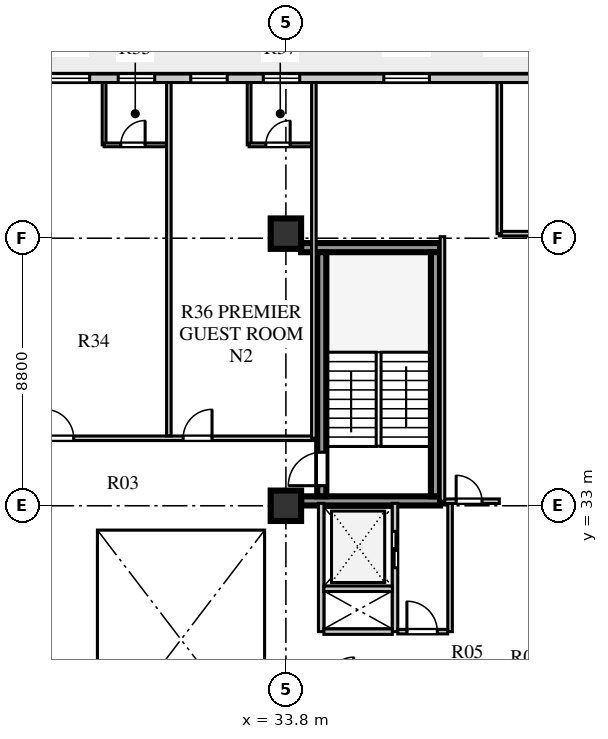
"""IFC4 building model, lengths in metres.
Left out: names, types, materials, properties, quantities, classifications, styles, units other than length and angle.
Written with IfcOpenShell. Run it as: python <this file> out.ifc"""

import sys

from ifc_helpers import new_model, si_unit, direction, frame, frame_2d, origin, origin_2d, place, context, subcontext, project, spatial, rectangle, extrude, element, fill, save


model = new_model("IFC4")
c1 = context("Model", 3, precision=1e-05, world=origin(), true_north=direction((0.0, 1.0)))
c2 = subcontext(c1, "Body", "Model", "MODEL_VIEW")
j1 = project(units=[si_unit("LENGTHUNIT", "METRE"), si_unit("PLANEANGLEUNIT", "RADIAN")], contexts=[c1])
p1 = place(None, origin())
s1 = spatial("IfcSite", under=j1, at=p1, CompositionType="ELEMENT")
p2 = place(p1, origin())
s2 = spatial("IfcBuilding", under=s1, at=p2, CompositionType="ELEMENT")
p3 = place(p2, frame((0.0, 0.0, 134.8)))
s3 = spatial("IfcBuildingStorey", under=s2, at=p3, CompositionType="ELEMENT", Elevation=134.8)
for number, where, z_axis, x_axis in (
    (1, (34.3, 33.16, 0.0), (0.0, 0.0, 1.0), (1.0, 0.0, 0.0)),
    (2, (34.3, 41.49, 0.0), (0.0, 0.0, 1.0), (1.0, 0.0, 0.0)),
):
    element("IfcWall", number, at=place(p3, frame(where, z_axis=z_axis, x_axis=x_axis)), inside=s3, PredefinedType="SHEAR", context=c2, shape_type="SweptSolid", body=[
        extrude(rectangle(XDim=4.57, YDim=0.3, at=frame_2d((2.285, 0.0))), origin(), (0.0, 0.0, 1.0), 3.6),
    ])
p4 = place(p3, frame((34.98, 33.31, 0.0), z_axis=(0.0, 0.0, 1.0), x_axis=(0.0, 1.0, 0.0)))
e3 = element("IfcWall", 3, at=p4, inside=s3, PredefinedType="SHEAR", context=c2, shape_type="SweptSolid", body=[
    extrude(rectangle(XDim=8.03, YDim=0.3, at=frame_2d((4.015, 0.0))), origin(), (0.0, 0.0, 1.0), 3.6),
])
p5 = place(p4, frame((0.35, 0.0, 0.0)))
e4 = element("IfcOpeningElement", 4, at=p5, cuts=e3, PredefinedType="OPENING", context=c2, shape_type="SweptSolid", body=[
    extrude(rectangle(XDim=1.1, YDim=2.1, at=frame_2d((0.55, 1.05))), frame((0.0, 0.16, 0.0), z_axis=(0.0, -1.0, 0.0), x_axis=(1.0, 0.0, 0.0)), (0.0, 0.0, 1.0), 0.32),
])
p6 = place(p3, frame((38.72, 33.31, 0.0), z_axis=(0.0, 0.0, 1.0), x_axis=(0.0, 1.0, 0.0)))
e5 = element("IfcWall", 5, at=p6, inside=s3, PredefinedType="SHEAR", context=c2, shape_type="SweptSolid", body=[
    extrude(rectangle(XDim=8.03, YDim=0.3, at=frame_2d((4.015, 0.0))), origin(), (0.0, 0.0, 1.0), 3.6),
])
for number, where, z_axis, x_axis in (
    (6, (33.8, 33.0, 0.0), (0.0, 0.0, 1.0), (1.0, 0.0, 0.0)),
    (7, (33.8, 41.95, 0.0), (0.0, 0.0, 1.0), (1.0, 0.0, 0.0)),
):
    element("IfcColumn", number, at=place(p3, frame(where, z_axis=z_axis, x_axis=x_axis)), inside=s3, PredefinedType="COLUMN", context=c2, shape_type="SweptSolid", body=[
        extrude(rectangle(XDim=1.0, YDim=1.0, at=origin_2d()), origin(), (0.0, 0.0, 1.0), 3.6),
    ])
p7 = place(p3, frame((45.35, 47.06, 0.0), z_axis=(0.0, 0.0, 1.0), x_axis=(-1.0, 0.0, 0.0)))
e8 = element("IfcWall", 8, at=p7, inside=s3, PredefinedType="STANDARD", context=c2, shape_type="SweptSolid", body=[
    extrude(rectangle(XDim=32.1, YDim=0.28, at=frame_2d((16.05, 0.0))), origin(), (0.0, 0.0, 1.0), 3.6),
])
p8 = place(p7, frame((30.15, 0.0, 0.0)))
e9 = element("IfcOpeningElement", 9, at=p8, cuts=e8, PredefinedType="OPENING", context=c2, shape_type="SweptSolid", body=[
    extrude(rectangle(XDim=1.0, YDim=2.05, at=frame_2d((0.5, 1.025))), frame((0.0, 0.15, 0.0), z_axis=(0.0, -1.0, 0.0), x_axis=(1.0, 0.0, 0.0)), (0.0, 0.0, 1.0), 0.3),
])
p9 = place(p7, frame((24.495, 0.0, 0.8)))
e10 = element("IfcOpeningElement", 10, at=p9, cuts=e8, PredefinedType="OPENING", context=c2, shape_type="SweptSolid", body=[
    extrude(rectangle(XDim=1.35, YDim=1.9, at=frame_2d((0.675, 0.95))), frame((0.0, 0.15, 0.0), z_axis=(0.0, -1.0, 0.0), x_axis=(1.0, 0.0, 0.0)), (0.0, 0.0, 1.0), 0.3),
])
p10 = place(p7, frame((18.005, 0.0, 0.8)))
e11 = element("IfcOpeningElement", 11, at=p10, cuts=e8, PredefinedType="OPENING", context=c2, shape_type="SweptSolid", body=[
    extrude(rectangle(XDim=1.65, YDim=1.95, at=frame_2d((0.825, 0.975))), frame((0.0, 0.15, 0.0), z_axis=(0.0, -1.0, 0.0), x_axis=(1.0, 0.0, 0.0)), (0.0, 0.0, 1.0), 0.3),
])
p11 = place(p7, frame((15.865, 0.0, 0.8)))
e12 = element("IfcOpeningElement", 12, at=p11, cuts=e8, PredefinedType="OPENING", context=c2, shape_type="SweptSolid", body=[
    extrude(rectangle(XDim=1.2, YDim=1.75, at=frame_2d((0.6, 0.875))), frame((0.0, 0.15, 0.0), z_axis=(0.0, -1.0, 0.0), x_axis=(1.0, 0.0, 0.0)), (0.0, 0.0, 1.0), 0.3),
])
p12 = place(p7, frame((13.48, 0.0, 0.8)))
e13 = element("IfcOpeningElement", 13, at=p12, cuts=e8, PredefinedType="OPENING", context=c2, shape_type="SweptSolid", body=[
    extrude(rectangle(XDim=1.2, YDim=1.75, at=frame_2d((0.6, 0.875))), frame((0.0, 0.15, 0.0), z_axis=(0.0, -1.0, 0.0), x_axis=(1.0, 0.0, 0.0)), (0.0, 0.0, 1.0), 0.3),
])
p13 = place(p7, frame((11.095, 0.0, 0.8)))
e14 = element("IfcOpeningElement", 14, at=p13, cuts=e8, PredefinedType="OPENING", context=c2, shape_type="SweptSolid", body=[
    extrude(rectangle(XDim=1.2, YDim=1.75, at=frame_2d((0.6, 0.875))), frame((0.0, 0.15, 0.0), z_axis=(0.0, -1.0, 0.0), x_axis=(1.0, 0.0, 0.0)), (0.0, 0.0, 1.0), 0.3),
])
p14 = place(p7, frame((6.83, 0.0, 0.8)))
e15 = element("IfcOpeningElement", 15, at=p14, cuts=e8, PredefinedType="OPENING", context=c2, shape_type="SweptSolid", body=[
    extrude(rectangle(XDim=1.5, YDim=2.0, at=frame_2d((0.75, 1.0))), frame((0.0, 0.15, 0.0), z_axis=(0.0, -1.0, 0.0), x_axis=(1.0, 0.0, 0.0)), (0.0, 0.0, 1.0), 0.3),
])
p15 = place(p7, frame((1.72, 0.0, 0.8)))
e16 = element("IfcOpeningElement", 16, at=p15, cuts=e8, PredefinedType="OPENING", context=c2, shape_type="SweptSolid", body=[
    extrude(rectangle(XDim=1.2, YDim=1.75, at=frame_2d((0.6, 0.875))), frame((0.0, 0.15, 0.0), z_axis=(0.0, -1.0, 0.0), x_axis=(1.0, 0.0, 0.0)), (0.0, 0.0, 1.0), 0.3),
])
p16 = place(p3, frame((34.96, 28.86, 0.0), z_axis=(0.0, 0.0, 1.0), x_axis=(0.0, 1.0, 0.0)))
e17 = element("IfcWall", 17, at=p16, inside=s3, PredefinedType="SOLIDWALL", context=c2, shape_type="SweptSolid", body=[
    extrude(rectangle(XDim=4.22, YDim=0.18, at=frame_2d((2.11, 0.0))), origin(), (0.0, 0.0, 1.0), 3.6),
])
p17 = place(p3, frame((37.39, 28.86, 0.0), z_axis=(0.0, 0.0, 1.0), x_axis=(0.0, 1.0, 0.0)))
e18 = element("IfcWall", 18, at=p17, inside=s3, PredefinedType="SOLIDWALL", context=c2, shape_type="SweptSolid", body=[
    extrude(rectangle(XDim=4.22, YDim=0.18, at=frame_2d((2.11, 0.0))), origin(), (0.0, 0.0, 1.0), 3.6),
])
p18 = place(p17, frame((2.1, 0.0, 0.0)))
e19 = element("IfcOpeningElement", 19, at=p18, cuts=e18, PredefinedType="OPENING", context=c2, shape_type="SweptSolid", body=[
    extrude(rectangle(XDim=1.2, YDim=2.12, at=frame_2d((0.6, 1.06))), frame((0.0, 0.1, 0.0), z_axis=(0.0, -1.0, 0.0), x_axis=(1.0, 0.0, 0.0)), (0.0, 0.0, 1.0), 0.2),
])
for number, where, z_axis, x_axis in (
    (20, (35.05, 28.86, 0.0), (0.0, 0.0, 1.0), (1.0, 0.0, 0.0)),
    (21, (35.05, 30.27, 0.0), (0.0, 0.0, 1.0), (1.0, 0.0, 0.0)),
):
    element("IfcWall", number, at=place(p3, frame(where, z_axis=z_axis, x_axis=x_axis)), inside=s3, PredefinedType="SOLIDWALL", context=c2, shape_type="SweptSolid", body=[
        extrude(rectangle(XDim=2.25, YDim=0.18, at=frame_2d((1.125, 0.0))), origin(), (0.0, 0.0, 1.0), 3.6),
    ])
p19 = place(p3, frame((39.2, 28.86, 0.0), z_axis=(0.0, 0.0, 1.0), x_axis=(0.0, 1.0, 0.0)))
e22 = element("IfcWall", 22, at=p19, inside=s3, PredefinedType="PARTITIONING", context=c2, shape_type="SweptSolid", body=[
    extrude(rectangle(XDim=4.22, YDim=0.15, at=frame_2d((2.11, 0.0))), origin(), (0.0, 0.0, 1.0), 3.6),
])
p20 = place(p3, frame((37.48, 28.86, 0.0), z_axis=(0.0, 0.0, 1.0), x_axis=(1.0, 0.0, 0.0)))
e23 = element("IfcWall", 23, at=p20, inside=s3, PredefinedType="PARTITIONING", context=c2, shape_type="SweptSolid", body=[
    extrude(rectangle(XDim=1.64, YDim=0.15, at=frame_2d((0.82, 0.0))), origin(), (0.0, 0.0, 1.0), 3.6),
])
p21 = place(p20, frame((0.3, 0.0, 0.0)))
e24 = element("IfcOpeningElement", 24, at=p21, cuts=e23, PredefinedType="OPENING", context=c2, shape_type="SweptSolid", body=[
    extrude(rectangle(XDim=1.0, YDim=2.1, at=frame_2d((0.5, 1.05))), frame((0.0, 0.085, 0.0), z_axis=(0.0, -1.0, 0.0), x_axis=(1.0, 0.0, 0.0)), (0.0, 0.0, 1.0), 0.17),
])
p22 = place(p3, frame((25.22, 35.22, 0.0), z_axis=(0.0, 0.0, 1.0), x_axis=(1.0, 0.0, 0.0)))
e25 = element("IfcWall", 25, at=p22, inside=s3, PredefinedType="PARTITIONING", context=c2, shape_type="SweptSolid", body=[
    extrude(rectangle(XDim=9.5, YDim=0.15, at=frame_2d((4.75, 0.0))), origin(), (0.0, 0.0, 1.0), 3.6),
])
p23 = place(p22, frame((0.65, 0.0, 0.0)))
e26 = element("IfcOpeningElement", 26, at=p23, cuts=e25, PredefinedType="OPENING", context=c2, shape_type="SweptSolid", body=[
    extrude(rectangle(XDim=0.95, YDim=2.1, at=frame_2d((0.475, 1.05))), frame((0.0, 0.085, 0.0), z_axis=(0.0, -1.0, 0.0), x_axis=(1.0, 0.0, 0.0)), (0.0, 0.0, 1.0), 0.17),
])
p24 = place(p22, frame((5.2, 0.0, 0.0)))
e27 = element("IfcOpeningElement", 27, at=p24, cuts=e25, PredefinedType="OPENING", context=c2, shape_type="SweptSolid", body=[
    extrude(rectangle(XDim=0.95, YDim=2.1, at=frame_2d((0.475, 1.05))), frame((0.0, 0.085, 0.0), z_axis=(0.0, -1.0, 0.0), x_axis=(1.0, 0.0, 0.0)), (0.0, 0.0, 1.0), 0.17),
])
p25 = place(p3, frame((40.82, 41.95, 0.0), z_axis=(0.0, 0.0, 1.0), x_axis=(1.0, 0.0, 0.0)))
e28 = element("IfcWall", 28, at=p25, inside=s3, PredefinedType="PARTITIONING", context=c2, shape_type="SweptSolid", body=[
    extrude(rectangle(XDim=7.3, YDim=0.15, at=frame_2d((3.65, 0.0))), origin(), (0.0, 0.0, 1.0), 2.95),
])
p26 = place(p3, frame((34.72, 35.22, 0.0), z_axis=(0.0, 0.0, 1.0), x_axis=(0.0, 1.0, 0.0)))
e29 = element("IfcWall", 29, at=p26, inside=s3, PredefinedType="PARTITIONING", context=c2, shape_type="SweptSolid", body=[
    extrude(rectangle(XDim=11.7, YDim=0.15, at=frame_2d((5.85, 0.0))), origin(), (0.0, 0.0, 1.0), 3.6),
])
p27 = place(p3, frame((29.95, 35.3, 0.0), z_axis=(0.0, 0.0, 1.0), x_axis=(0.0, 1.0, 0.0)))
e30 = element("IfcWall", 30, at=p27, inside=s3, PredefinedType="PARTITIONING", context=c2, shape_type="SweptSolid", body=[
    extrude(rectangle(XDim=11.62, YDim=0.15, at=frame_2d((5.81, 0.0))), origin(), (0.0, 0.0, 1.0), 3.6),
])
p28 = place(p3, frame((27.82, 44.87, 0.0), z_axis=(0.0, 0.0, 1.0), x_axis=(0.0, 1.0, 0.0)))
e31 = element("IfcWall", 31, at=p28, inside=s3, PredefinedType="PLUMBINGWALL", context=c2, shape_type="SweptSolid", body=[
    extrude(rectangle(XDim=2.05, YDim=0.125, at=frame_2d((1.025, 0.0))), origin(), (0.0, 0.0, 1.0), 3.6),
])
p29 = place(p3, frame((27.82, 44.87, 0.0), z_axis=(0.0, 0.0, 1.0), x_axis=(1.0, 0.0, 0.0)))
e32 = element("IfcWall", 32, at=p29, inside=s3, PredefinedType="PLUMBINGWALL", context=c2, shape_type="SweptSolid", body=[
    extrude(rectangle(XDim=2.05, YDim=0.125, at=frame_2d((1.025, 0.0))), origin(), (0.0, 0.0, 1.0), 3.6),
])
p30 = place(p29, frame((0.55, 0.0, 0.0)))
e33 = element("IfcOpeningElement", 33, at=p30, cuts=e32, PredefinedType="OPENING", context=c2, shape_type="SweptSolid", body=[
    extrude(rectangle(XDim=0.8, YDim=2.05, at=frame_2d((0.4, 1.025))), frame((0.0, 0.073, 0.0), z_axis=(0.0, -1.0, 0.0), x_axis=(1.0, 0.0, 0.0)), (0.0, 0.0, 1.0), 0.145),
])
p31 = place(p3, frame((32.59, 44.87, 0.0), z_axis=(0.0, 0.0, 1.0), x_axis=(0.0, 1.0, 0.0)))
e34 = element("IfcWall", 34, at=p31, inside=s3, PredefinedType="PLUMBINGWALL", context=c2, shape_type="SweptSolid", body=[
    extrude(rectangle(XDim=2.05, YDim=0.125, at=frame_2d((1.025, 0.0))), origin(), (0.0, 0.0, 1.0), 3.6),
])
p32 = place(p3, frame((32.59, 44.87, 0.0), z_axis=(0.0, 0.0, 1.0), x_axis=(1.0, 0.0, 0.0)))
e35 = element("IfcWall", 35, at=p32, inside=s3, PredefinedType="PLUMBINGWALL", context=c2, shape_type="SweptSolid", body=[
    extrude(rectangle(XDim=2.05, YDim=0.125, at=frame_2d((1.025, 0.0))), origin(), (0.0, 0.0, 1.0), 3.6),
])
p33 = place(p32, frame((0.55, 0.0, 0.0)))
e36 = element("IfcOpeningElement", 36, at=p33, cuts=e35, PredefinedType="OPENING", context=c2, shape_type="SweptSolid", body=[
    extrude(rectangle(XDim=0.8, YDim=2.05, at=frame_2d((0.4, 1.025))), frame((0.0, 0.073, 0.0), z_axis=(0.0, -1.0, 0.0), x_axis=(1.0, 0.0, 0.0)), (0.0, 0.0, 1.0), 0.145),
])
p34 = place(p3, frame((38.95, 33.15, 0.0), z_axis=(0.0, 0.0, 1.0), x_axis=(1.0, 0.0, 0.0)))
e37 = element("IfcWall", 37, at=p34, inside=s3, PredefinedType="PARTITIONING", context=c2, shape_type="SweptSolid", body=[
    extrude(rectangle(XDim=1.87, YDim=0.15, at=frame_2d((0.935, 0.0))), origin(), (0.0, 0.0, 1.0), 3.6),
])
p35 = place(p34, frame((0.45, 0.0, 0.0)))
e38 = element("IfcOpeningElement", 38, at=p35, cuts=e37, PredefinedType="OPENING", context=c2, shape_type="SweptSolid", body=[
    extrude(rectangle(XDim=0.85, YDim=2.05, at=frame_2d((0.425, 1.025))), frame((0.0, 0.085, 0.0), z_axis=(0.0, -1.0, 0.0), x_axis=(1.0, 0.0, 0.0)), (0.0, 0.0, 1.0), 0.17),
])
p36 = place(p3, frame((38.95, 33.15, 0.0), z_axis=(0.0, 0.0, 1.0), x_axis=(0.0, 1.0, 0.0)))
e39 = element("IfcWall", 39, at=p36, inside=s3, PredefinedType="PARTITIONING", context=c2, shape_type="SweptSolid", body=[
    extrude(rectangle(XDim=8.7, YDim=0.15, at=frame_2d((4.35, 0.0))), origin(), (0.0, 0.0, 1.0), 3.6),
])
p37 = place(p3, frame((40.82, 41.95, 0.0), z_axis=(0.0, 0.0, 1.0), x_axis=(0.0, 1.0, 0.0)))
e40 = element("IfcWall", 40, at=p37, inside=s3, PredefinedType="PARTITIONING", context=c2, shape_type="SweptSolid", body=[
    extrude(rectangle(XDim=4.97, YDim=0.15, at=frame_2d((2.485, 0.0))), origin(), (0.0, 0.0, 1.0), 3.6),
])
p38 = place(p10, origin())
e41 = element("IfcWindow", 41, at=p38, inside=s3, PartitioningType="SINGLE_PANEL", PredefinedType="WINDOW", context=c2, shape_type="SweptSolid", body=[
    extrude(rectangle(XDim=1.65, YDim=1.95, at=frame_2d((0.825, 0.975))), frame((0.0, 0.03, 0.0), z_axis=(0.0, -1.0, 0.0), x_axis=(1.0, 0.0, 0.0)), (0.0, 0.0, 1.0), 0.06),
])
fill(e11, e41)
p39 = place(p11, origin())
e42 = element("IfcWindow", 42, at=p39, inside=s3, PartitioningType="SINGLE_PANEL", PredefinedType="WINDOW", context=c2, shape_type="SweptSolid", body=[
    extrude(rectangle(XDim=1.2, YDim=1.75, at=frame_2d((0.6, 0.875))), frame((0.0, 0.03, 0.0), z_axis=(0.0, -1.0, 0.0), x_axis=(1.0, 0.0, 0.0)), (0.0, 0.0, 1.0), 0.06),
])
fill(e12, e42)
p40 = place(p12, origin())
e43 = element("IfcWindow", 43, at=p40, inside=s3, PartitioningType="SINGLE_PANEL", PredefinedType="WINDOW", context=c2, shape_type="SweptSolid", body=[
    extrude(rectangle(XDim=1.2, YDim=1.75, at=frame_2d((0.6, 0.875))), frame((0.0, 0.03, 0.0), z_axis=(0.0, -1.0, 0.0), x_axis=(1.0, 0.0, 0.0)), (0.0, 0.0, 1.0), 0.06),
])
fill(e13, e43)
p41 = place(p13, origin())
e44 = element("IfcWindow", 44, at=p41, inside=s3, PartitioningType="SINGLE_PANEL", PredefinedType="WINDOW", context=c2, shape_type="SweptSolid", body=[
    extrude(rectangle(XDim=1.2, YDim=1.75, at=frame_2d((0.6, 0.875))), frame((0.0, 0.03, 0.0), z_axis=(0.0, -1.0, 0.0), x_axis=(1.0, 0.0, 0.0)), (0.0, 0.0, 1.0), 0.06),
])
fill(e14, e44)
p42 = place(p14, origin())
e45 = element("IfcWindow", 45, at=p42, inside=s3, PartitioningType="SINGLE_PANEL", PredefinedType="WINDOW", context=c2, shape_type="SweptSolid", body=[
    extrude(rectangle(XDim=1.5, YDim=2.0, at=frame_2d((0.75, 1.0))), frame((0.0, 0.03, 0.0), z_axis=(0.0, -1.0, 0.0), x_axis=(1.0, 0.0, 0.0)), (0.0, 0.0, 1.0), 0.06),
])
fill(e15, e45)
p43 = place(p5, origin())
e46 = element("IfcDoor", 46, at=p43, inside=s3, OperationType="SINGLE_SWING_LEFT", PredefinedType="DOOR", context=c2, shape_type="SweptSolid", body=[
    extrude(rectangle(XDim=1.1, YDim=2.1, at=frame_2d((0.55, 1.05))), frame((0.0, 0.025, 0.0), z_axis=(0.0, -1.0, 0.0), x_axis=(1.0, 0.0, 0.0)), (0.0, 0.0, 1.0), 0.05),
])
fill(e4, e46)
p44 = place(p18, frame((1.2, 0.0, 0.0), z_axis=(0.0, 0.0, 1.0), x_axis=(-1.0, 0.0, 0.0)))
e47 = element("IfcDoor", 47, at=p44, inside=s3, OperationType="DOUBLE_DOOR_SLIDING", PredefinedType="DOOR", context=c2, shape_type="SweptSolid", body=[
    extrude(rectangle(XDim=1.2, YDim=2.12, at=frame_2d((0.6, 1.06))), frame((0.0, 0.025, 0.0), z_axis=(0.0, -1.0, 0.0), x_axis=(1.0, 0.0, 0.0)), (0.0, 0.0, 1.0), 0.05),
])
fill(e19, e47)
p45 = place(p21, origin())
e48 = element("IfcDoor", 48, at=p45, inside=s3, OperationType="SINGLE_SWING_LEFT", PredefinedType="DOOR", context=c2, shape_type="SweptSolid", body=[
    extrude(rectangle(XDim=1.0, YDim=2.1, at=frame_2d((0.5, 1.05))), frame((0.0, 0.025, 0.0), z_axis=(0.0, -1.0, 0.0), x_axis=(1.0, 0.0, 0.0)), (0.0, 0.0, 1.0), 0.05),
])
fill(e24, e48)
p46 = place(p23, origin())
e49 = element("IfcDoor", 49, at=p46, inside=s3, OperationType="SINGLE_SWING_LEFT", PredefinedType="DOOR", context=c2, shape_type="SweptSolid", body=[
    extrude(rectangle(XDim=0.95, YDim=2.1, at=frame_2d((0.475, 1.05))), frame((0.0, 0.025, 0.0), z_axis=(0.0, -1.0, 0.0), x_axis=(1.0, 0.0, 0.0)), (0.0, 0.0, 1.0), 0.05),
])
fill(e26, e49)
p47 = place(p30, frame((0.8, 0.0, 0.0), z_axis=(0.0, 0.0, 1.0), x_axis=(-1.0, 0.0, 0.0)))
e50 = element("IfcDoor", 50, at=p47, inside=s3, OperationType="SINGLE_SWING_LEFT", PredefinedType="DOOR", context=c2, shape_type="SweptSolid", body=[
    extrude(rectangle(XDim=0.8, YDim=2.05, at=frame_2d((0.4, 1.025))), frame((0.0, 0.025, 0.0), z_axis=(0.0, -1.0, 0.0), x_axis=(1.0, 0.0, 0.0)), (0.0, 0.0, 1.0), 0.05),
])
fill(e33, e50)
p48 = place(p24, origin())
e51 = element("IfcDoor", 51, at=p48, inside=s3, OperationType="SINGLE_SWING_RIGHT", PredefinedType="DOOR", context=c2, shape_type="SweptSolid", body=[
    extrude(rectangle(XDim=0.95, YDim=2.1, at=frame_2d((0.475, 1.05))), frame((0.0, 0.025, 0.0), z_axis=(0.0, -1.0, 0.0), x_axis=(1.0, 0.0, 0.0)), (0.0, 0.0, 1.0), 0.05),
])
fill(e27, e51)
p49 = place(p33, frame((0.8, 0.0, 0.0), z_axis=(0.0, 0.0, 1.0), x_axis=(-1.0, 0.0, 0.0)))
e52 = element("IfcDoor", 52, at=p49, inside=s3, OperationType="SINGLE_SWING_LEFT", PredefinedType="DOOR", context=c2, shape_type="SweptSolid", body=[
    extrude(rectangle(XDim=0.8, YDim=2.05, at=frame_2d((0.4, 1.025))), frame((0.0, 0.025, 0.0), z_axis=(0.0, -1.0, 0.0), x_axis=(1.0, 0.0, 0.0)), (0.0, 0.0, 1.0), 0.05),
])
fill(e36, e52)
p50 = place(p35, origin())
e53 = element("IfcDoor", 53, at=p50, inside=s3, OperationType="SINGLE_SWING_LEFT", PredefinedType="DOOR", context=c2, shape_type="SweptSolid", body=[
    extrude(rectangle(XDim=0.85, YDim=2.05, at=frame_2d((0.425, 1.025))), frame((0.0, 0.025, 0.0), z_axis=(0.0, -1.0, 0.0), x_axis=(1.0, 0.0, 0.0)), (0.0, 0.0, 1.0), 0.05),
])
fill(e38, e53)
save(model, sys.argv[1])
